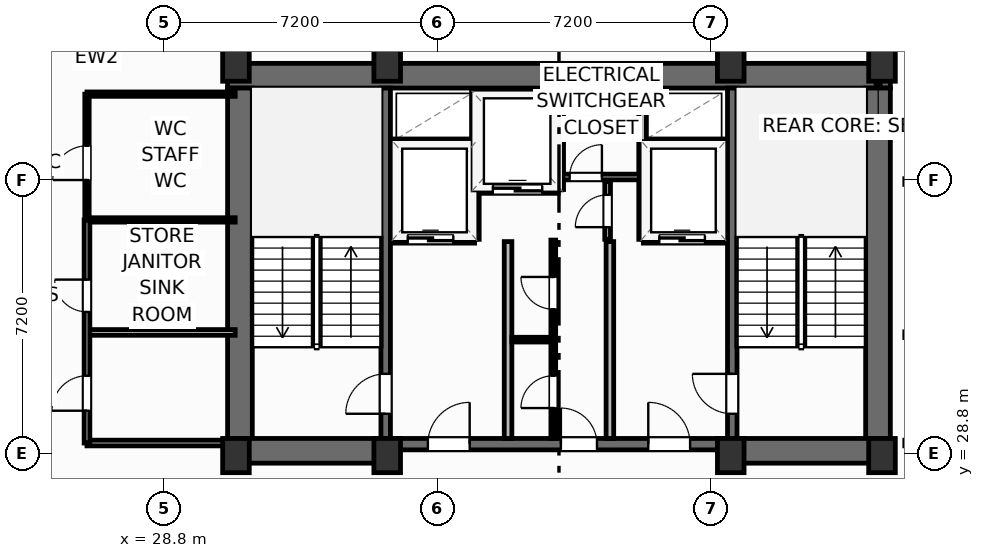
"""IFC4 building model, lengths in metres.
Left out: names, types, materials, properties, quantities, classifications, styles, units other than length and angle.
Written with IfcOpenShell. Run it as: python <this file> out.ifc"""

import sys

from ifc_helpers import new_model, si_unit, direction, frame, frame_2d, origin, origin_2d, place, context, subcontext, project, spatial, rectangle, extrude, element, fill, save


model = new_model("IFC4")
c1 = context("Model", 3, precision=1e-05, world=origin(), true_north=direction((0.0, 1.0)))
c2 = subcontext(c1, "Body", "Model", "MODEL_VIEW")
j1 = project(units=[si_unit("LENGTHUNIT", "METRE"), si_unit("PLANEANGLEUNIT", "RADIAN")], contexts=[c1])
p1 = place(None, origin())
s1 = spatial("IfcSite", under=j1, at=p1, CompositionType="ELEMENT")
p2 = place(p1, origin())
s2 = spatial("IfcBuilding", under=s1, at=p2, CompositionType="ELEMENT")
p3 = place(p2, frame((0.0, 0.0, 220.1)))
s3 = spatial("IfcBuildingStorey", under=s2, at=p3, CompositionType="ELEMENT", Elevation=220.1)
for number, where, z_axis, x_axis in (
    (1, (30.7, 28.75, 0.0), (0.0, 0.0, 1.0), (1.0, 0.0, 0.0)),
    (2, (34.68, 28.75, 0.0), (0.0, 0.0, 1.0), (1.0, 0.0, 0.0)),
    (3, (43.72, 28.75, 0.0), (0.0, 0.0, 1.0), (1.0, 0.0, 0.0)),
    (4, (47.7, 28.75, 0.0), (0.0, 0.0, 1.0), (1.0, 0.0, 0.0)),
    (5, (30.7, 39.05, 0.0), (0.0, 0.0, 1.0), (1.0, 0.0, 0.0)),
    (6, (34.68, 39.05, 0.0), (0.0, 0.0, 1.0), (1.0, 0.0, 0.0)),
    (7, (43.72, 39.05, 0.0), (0.0, 0.0, 1.0), (1.0, 0.0, 0.0)),
    (8, (47.7, 39.05, 0.0), (0.0, 0.0, 1.0), (1.0, 0.0, 0.0)),
):
    element("IfcColumn", number, at=place(p3, frame(where, z_axis=z_axis, x_axis=x_axis)), inside=s3, PredefinedType="COLUMN", context=c2, shape_type="SweptSolid", body=[
        extrude(rectangle(XDim=0.7, YDim=0.9, at=origin_2d()), origin(), (0.0, 0.0, 1.0), 3.7),
    ])
p4 = place(p3, frame((30.48, 38.745, 0.0), z_axis=(0.0, 0.0, 1.0), x_axis=(1.0, 0.0, 0.0)))
e9 = element("IfcWall", 9, at=p4, inside=s3, PredefinedType="SHEAR", context=c2, shape_type="SweptSolid", body=[
    extrude(rectangle(XDim=17.44, YDim=0.65, at=frame_2d((8.72, 0.0))), origin(), (0.0, 0.0, 1.0), 3.45),
])
for number, where, z_axis, x_axis in (
    (10, (30.805, 29.2, 0.0), (0.0, 0.0, 1.0), (0.0, 1.0, 0.0)),
    (11, (47.595, 29.2, 0.0), (0.0, 0.0, 1.0), (0.0, 1.0, 0.0)),
):
    element("IfcWall", number, at=place(p3, frame(where, z_axis=z_axis, x_axis=x_axis)), inside=s3, PredefinedType="SHEAR", context=c2, shape_type="SweptSolid", body=[
        extrude(rectangle(XDim=9.22, YDim=0.65, at=frame_2d((4.61, 0.0))), origin(), (0.0, 0.0, 1.0), 3.45),
    ])
p5 = place(p3, frame((30.48, 28.875, 0.0), z_axis=(0.0, 0.0, 1.0), x_axis=(1.0, 0.0, 0.0)))
e12 = element("IfcWall", 12, at=p5, inside=s3, PredefinedType="SHEAR", context=c2, shape_type="SweptSolid", body=[
    extrude(rectangle(XDim=4.32, YDim=0.65, at=frame_2d((2.16, 0.0))), origin(), (0.0, 0.0, 1.0), 3.45),
])
p6 = place(p3, frame((43.6, 28.875, 0.0), z_axis=(0.0, 0.0, 1.0), x_axis=(1.0, 0.0, 0.0)))
e13 = element("IfcWall", 13, at=p6, inside=s3, PredefinedType="SHEAR", context=c2, shape_type="SweptSolid", body=[
    extrude(rectangle(XDim=4.32, YDim=0.65, at=frame_2d((2.16, 0.0))), origin(), (0.0, 0.0, 1.0), 3.45),
])
p7 = place(p3, frame((34.8, 29.05, 0.0), z_axis=(0.0, 0.0, 1.0), x_axis=(1.0, 0.0, 0.0)))
e14 = element("IfcWall", 14, at=p7, inside=s3, PredefinedType="SHEAR", context=c2, shape_type="SweptSolid", body=[
    extrude(rectangle(XDim=8.8, YDim=0.3, at=frame_2d((4.4, 0.0))), origin(), (0.0, 0.0, 1.0), 3.45),
])
p8 = place(p7, frame((0.95, 0.0, 0.0)))
e15 = element("IfcOpeningElement", 15, at=p8, cuts=e14, PredefinedType="OPENING", context=c2, shape_type="SweptSolid", body=[
    extrude(rectangle(XDim=1.1, YDim=2.15, at=frame_2d((0.55, 1.075))), frame((0.0, 0.16, 0.0), z_axis=(0.0, -1.0, 0.0), x_axis=(1.0, 0.0, 0.0)), (0.0, 0.0, 1.0), 0.32),
])
p9 = place(p7, frame((6.75, 0.0, 0.0)))
e16 = element("IfcOpeningElement", 16, at=p9, cuts=e14, PredefinedType="OPENING", context=c2, shape_type="SweptSolid", body=[
    extrude(rectangle(XDim=1.1, YDim=2.15, at=frame_2d((0.55, 1.075))), frame((0.0, 0.16, 0.0), z_axis=(0.0, -1.0, 0.0), x_axis=(1.0, 0.0, 0.0)), (0.0, 0.0, 1.0), 0.32),
])
p10 = place(p7, frame((4.45, 0.0, 0.0)))
e17 = element("IfcOpeningElement", 17, at=p10, cuts=e14, PredefinedType="OPENING", context=c2, shape_type="SweptSolid", body=[
    extrude(rectangle(XDim=0.95, YDim=2.15, at=frame_2d((0.475, 1.075))), frame((0.0, 0.16, 0.0), z_axis=(0.0, -1.0, 0.0), x_axis=(1.0, 0.0, 0.0)), (0.0, 0.0, 1.0), 0.32),
])
p11 = place(p3, frame((34.64, 29.2, 0.0), z_axis=(0.0, 0.0, 1.0), x_axis=(0.0, 1.0, 0.0)))
e18 = element("IfcWall", 18, at=p11, inside=s3, PredefinedType="SHEAR", context=c2, shape_type="SweptSolid", body=[
    extrude(rectangle(XDim=9.22, YDim=0.25, at=frame_2d((4.61, 0.0))), origin(), (0.0, 0.0, 1.0), 3.45),
])
p12 = place(p11, frame((0.65, 0.0, 0.0)))
e19 = element("IfcOpeningElement", 19, at=p12, cuts=e18, PredefinedType="OPENING", context=c2, shape_type="SweptSolid", body=[
    extrude(rectangle(XDim=1.05, YDim=2.15, at=frame_2d((0.525, 1.075))), frame((0.0, 0.135, 0.0), z_axis=(0.0, -1.0, 0.0), x_axis=(1.0, 0.0, 0.0)), (0.0, 0.0, 1.0), 0.27),
])
p13 = place(p3, frame((43.76, 29.2, 0.0), z_axis=(0.0, 0.0, 1.0), x_axis=(0.0, 1.0, 0.0)))
e20 = element("IfcWall", 20, at=p13, inside=s3, PredefinedType="SHEAR", context=c2, shape_type="SweptSolid", body=[
    extrude(rectangle(XDim=9.22, YDim=0.25, at=frame_2d((4.61, 0.0))), origin(), (0.0, 0.0, 1.0), 3.45),
])
p14 = place(p13, frame((0.65, 0.0, 0.0)))
e21 = element("IfcOpeningElement", 21, at=p14, cuts=e20, PredefinedType="OPENING", context=c2, shape_type="SweptSolid", body=[
    extrude(rectangle(XDim=1.05, YDim=2.15, at=frame_2d((0.525, 1.075))), frame((0.0, 0.135, 0.0), z_axis=(0.0, -1.0, 0.0), x_axis=(1.0, 0.0, 0.0)), (0.0, 0.0, 1.0), 0.27),
])
p15 = place(p3, frame((23.149, 38.887, 0.0), z_axis=(0.0, 0.0, 1.0), x_axis=(0.9352192676, 0.354069091436, 0.0)))
e22 = element("IfcWall", 22, at=p15, inside=s3, PredefinedType="SOLIDWALL", context=c2, shape_type="SweptSolid", body=[
    extrude(rectangle(XDim=6.0, YDim=0.22, at=frame_2d((3.0, 0.0))), origin(), (0.0, 0.0, 1.0), 2.73),
])
p16 = place(p15, frame((3.5, 0.0, 0.0)))
e23 = element("IfcOpeningElement", 23, at=p16, cuts=e22, PredefinedType="OPENING", context=c2, shape_type="SweptSolid", body=[
    extrude(rectangle(XDim=2.1, YDim=2.3, at=frame_2d((1.05, 1.15))), frame((0.0, 0.12, 0.0), z_axis=(0.0, -1.0, 0.0), x_axis=(1.0, 0.0, 0.0)), (0.0, 0.0, 1.0), 0.24),
])
p17 = place(p15, frame((0.55, 0.0, 0.75)))
e24 = element("IfcOpeningElement", 24, at=p17, cuts=e22, PredefinedType="OPENING", context=c2, shape_type="SweptSolid", body=[
    extrude(rectangle(XDim=1.85, YDim=1.75, at=frame_2d((0.925, 0.875))), frame((0.0, 0.12, 0.0), z_axis=(0.0, -1.0, 0.0), x_axis=(1.0, 0.0, 0.0)), (0.0, 0.0, 1.0), 0.24),
])
for number, where, z_axis, x_axis in (
    (25, (37.86, 29.2, 0.0), (0.0, 0.0, 1.0), (0.0, 1.0, 0.0)),
    (26, (40.54, 29.2, 0.0), (0.0, 0.0, 1.0), (0.0, 1.0, 0.0)),
):
    element("IfcWall", number, at=place(p3, frame(where, z_axis=z_axis, x_axis=x_axis)), inside=s3, PredefinedType="PARTITIONING", context=c2, shape_type="SweptSolid", body=[
        extrude(rectangle(XDim=5.18, YDim=0.2, at=frame_2d((2.59, 0.0))), origin(), (0.0, 0.0, 1.0), 3.45),
    ])
p18 = place(p3, frame((34.8, 34.44, 0.0), z_axis=(0.0, 0.0, 1.0), x_axis=(1.0, 0.0, 0.0)))
e27 = element("IfcWall", 27, at=p18, inside=s3, PredefinedType="PARTITIONING", context=c2, shape_type="SweptSolid", body=[
    extrude(rectangle(XDim=2.18, YDim=0.2, at=frame_2d((1.09, 0.0))), origin(), (0.0, 0.0, 1.0), 3.45),
])
p19 = place(p18, frame((0.42, 0.0, 0.0)))
e28 = element("IfcOpeningElement", 28, at=p19, cuts=e27, PredefinedType="OPENING", context=c2, shape_type="SweptSolid", body=[
    extrude(rectangle(XDim=1.2, YDim=2.2, at=frame_2d((0.6, 1.1))), frame((0.0, 0.11, 0.0), z_axis=(0.0, -1.0, 0.0), x_axis=(1.0, 0.0, 0.0)), (0.0, 0.0, 1.0), 0.22),
])
p20 = place(p3, frame((34.8, 36.98, 0.0), z_axis=(0.0, 0.0, 1.0), x_axis=(1.0, 0.0, 0.0)))
e29 = element("IfcWall", 29, at=p20, inside=s3, PredefinedType="PARTITIONING", context=c2, shape_type="SweptSolid", body=[
    extrude(rectangle(XDim=2.18, YDim=0.2, at=frame_2d((1.09, 0.0))), origin(), (0.0, 0.0, 1.0), 3.45),
])
p21 = place(p3, frame((37.0, 34.44, 0.0), z_axis=(0.0, 0.0, 1.0), x_axis=(0.0, 1.0, 0.0)))
e30 = element("IfcWall", 30, at=p21, inside=s3, PredefinedType="PARTITIONING", context=c2, shape_type="SweptSolid", body=[
    extrude(rectangle(XDim=3.9, YDim=0.2, at=frame_2d((1.95, 0.0))), origin(), (0.0, 0.0, 1.0), 3.45),
])
p22 = place(p3, frame((41.42, 34.44, 0.0), z_axis=(0.0, 0.0, 1.0), x_axis=(1.0, 0.0, 0.0)))
e31 = element("IfcWall", 31, at=p22, inside=s3, PredefinedType="PARTITIONING", context=c2, shape_type="SweptSolid", body=[
    extrude(rectangle(XDim=2.18, YDim=0.2, at=frame_2d((1.09, 0.0))), origin(), (0.0, 0.0, 1.0), 3.45),
])
p23 = place(p22, frame((0.42, 0.0, 0.0)))
e32 = element("IfcOpeningElement", 32, at=p23, cuts=e31, PredefinedType="OPENING", context=c2, shape_type="SweptSolid", body=[
    extrude(rectangle(XDim=1.2, YDim=2.2, at=frame_2d((0.6, 1.1))), frame((0.0, 0.11, 0.0), z_axis=(0.0, -1.0, 0.0), x_axis=(1.0, 0.0, 0.0)), (0.0, 0.0, 1.0), 0.22),
])
p24 = place(p3, frame((41.42, 36.98, 0.0), z_axis=(0.0, 0.0, 1.0), x_axis=(1.0, 0.0, 0.0)))
e33 = element("IfcWall", 33, at=p24, inside=s3, PredefinedType="PARTITIONING", context=c2, shape_type="SweptSolid", body=[
    extrude(rectangle(XDim=2.18, YDim=0.2, at=frame_2d((1.09, 0.0))), origin(), (0.0, 0.0, 1.0), 3.45),
])
p25 = place(p3, frame((41.4, 34.44, 0.0), z_axis=(0.0, 0.0, 1.0), x_axis=(0.0, 1.0, 0.0)))
e34 = element("IfcWall", 34, at=p25, inside=s3, PredefinedType="PARTITIONING", context=c2, shape_type="SweptSolid", body=[
    extrude(rectangle(XDim=3.9, YDim=0.2, at=frame_2d((1.95, 0.0))), origin(), (0.0, 0.0, 1.0), 3.45),
])
p26 = place(p3, frame((37.06, 35.75, 0.0), z_axis=(0.0, 0.0, 1.0), x_axis=(1.0, 0.0, 0.0)))
e35 = element("IfcWall", 35, at=p26, inside=s3, PredefinedType="PARTITIONING", context=c2, shape_type="SweptSolid", body=[
    extrude(rectangle(XDim=2.12, YDim=0.2, at=frame_2d((1.06, 0.0))), origin(), (0.0, 0.0, 1.0), 3.45),
])
p27 = place(p26, frame((0.4, 0.0, 0.0)))
e36 = element("IfcOpeningElement", 36, at=p27, cuts=e35, PredefinedType="OPENING", context=c2, shape_type="SweptSolid", body=[
    extrude(rectangle(XDim=1.3, YDim=2.2, at=frame_2d((0.65, 1.1))), frame((0.0, 0.11, 0.0), z_axis=(0.0, -1.0, 0.0), x_axis=(1.0, 0.0, 0.0)), (0.0, 0.0, 1.0), 0.22),
])
p28 = place(p3, frame((39.22, 35.75, 0.0), z_axis=(0.0, 0.0, 1.0), x_axis=(0.0, 1.0, 0.0)))
e37 = element("IfcWall", 37, at=p28, inside=s3, PredefinedType="PARTITIONING", context=c2, shape_type="SweptSolid", body=[
    extrude(rectangle(XDim=2.59, YDim=0.2, at=frame_2d((1.295, 0.0))), origin(), (0.0, 0.0, 1.0), 3.45),
])
p29 = place(p3, frame((39.3, 36.08, 0.0), z_axis=(0.0, 0.0, 1.0), x_axis=(1.0, 0.0, 0.0)))
e38 = element("IfcWall", 38, at=p29, inside=s3, PredefinedType="PARTITIONING", context=c2, shape_type="SweptSolid", body=[
    extrude(rectangle(XDim=2.02, YDim=0.15, at=frame_2d((1.01, 0.0))), origin(), (0.0, 0.0, 1.0), 3.45),
])
p30 = place(p29, frame((0.18, 0.0, 0.0)))
e39 = element("IfcOpeningElement", 39, at=p30, cuts=e38, PredefinedType="OPENING", context=c2, shape_type="SweptSolid", body=[
    extrude(rectangle(XDim=0.85, YDim=2.05, at=frame_2d((0.425, 1.025))), frame((0.0, 0.085, 0.0), z_axis=(0.0, -1.0, 0.0), x_axis=(1.0, 0.0, 0.0)), (0.0, 0.0, 1.0), 0.17),
])
p31 = place(p3, frame((40.48, 34.44, 0.0), z_axis=(0.0, 0.0, 1.0), x_axis=(0.0, 1.0, 0.0)))
e40 = element("IfcWall", 40, at=p31, inside=s3, PredefinedType="PARTITIONING", context=c2, shape_type="SweptSolid", body=[
    extrude(rectangle(XDim=1.52, YDim=0.15, at=frame_2d((0.76, 0.0))), origin(), (0.0, 0.0, 1.0), 3.45),
])
p32 = place(p31, frame((0.32, 0.0, 0.0)))
e41 = element("IfcOpeningElement", 41, at=p32, cuts=e40, PredefinedType="OPENING", context=c2, shape_type="SweptSolid", body=[
    extrude(rectangle(XDim=0.85, YDim=2.05, at=frame_2d((0.425, 1.025))), frame((0.0, 0.085, 0.0), z_axis=(0.0, -1.0, 0.0), x_axis=(1.0, 0.0, 0.0)), (0.0, 0.0, 1.0), 0.17),
])
p33 = place(p3, frame((37.96, 31.8, 0.0), z_axis=(0.0, 0.0, 1.0), x_axis=(1.0, 0.0, 0.0)))
e42 = element("IfcWall", 42, at=p33, inside=s3, PredefinedType="PARTITIONING", context=c2, shape_type="SweptSolid", body=[
    extrude(rectangle(XDim=1.09, YDim=0.125, at=frame_2d((0.545, 0.0))), origin(), (0.0, 0.0, 1.0), 3.45),
])
p34 = place(p3, frame((39.05, 29.2, 0.0), z_axis=(0.0, 0.0, 1.0), x_axis=(0.0, 1.0, 0.0)))
e43 = element("IfcWall", 43, at=p34, inside=s3, PredefinedType="PARTITIONING", context=c2, shape_type="SweptSolid", body=[
    extrude(rectangle(XDim=5.22, YDim=0.125, at=frame_2d((2.61, 0.0))), origin(), (0.0, 0.0, 1.0), 3.45),
])
p35 = place(p34, frame((0.8, 0.0, 0.0)))
e44 = element("IfcOpeningElement", 44, at=p35, cuts=e43, PredefinedType="OPENING", context=c2, shape_type="SweptSolid", body=[
    extrude(rectangle(XDim=0.85, YDim=2.05, at=frame_2d((0.425, 1.025))), frame((0.0, 0.073, 0.0), z_axis=(0.0, -1.0, 0.0), x_axis=(1.0, 0.0, 0.0)), (0.0, 0.0, 1.0), 0.145),
])
p36 = place(p34, frame((3.4, 0.0, 0.0)))
e45 = element("IfcOpeningElement", 45, at=p36, cuts=e43, PredefinedType="OPENING", context=c2, shape_type="SweptSolid", body=[
    extrude(rectangle(XDim=0.85, YDim=2.05, at=frame_2d((0.425, 1.025))), frame((0.0, 0.073, 0.0), z_axis=(0.0, -1.0, 0.0), x_axis=(1.0, 0.0, 0.0)), (0.0, 0.0, 1.0), 0.145),
])
p37 = place(p3, frame((26.78, 29.08, 0.0), z_axis=(0.0, 0.0, 1.0), x_axis=(1.0, 0.0, 0.0)))
e46 = element("IfcWall", 46, at=p37, inside=s3, PredefinedType="PARTITIONING", context=c2, shape_type="SweptSolid", body=[
    extrude(rectangle(XDim=3.7, YDim=0.15, at=frame_2d((1.85, 0.0))), origin(), (0.0, 0.0, 1.0), 3.45),
])
p38 = place(p3, frame((26.8, 31.99, 0.0), z_axis=(0.0, 0.0, 1.0), x_axis=(1.0, 0.0, 0.0)))
e47 = element("IfcWall", 47, at=p38, inside=s3, PredefinedType="PARTITIONING", context=c2, shape_type="SweptSolid", body=[
    extrude(rectangle(XDim=3.88, YDim=0.15, at=frame_2d((1.94, 0.0))), origin(), (0.0, 0.0, 1.0), 3.45),
])
p39 = place(p3, frame((26.8, 34.95, 0.0), z_axis=(0.0, 0.0, 1.0), x_axis=(1.0, 0.0, 0.0)))
e48 = element("IfcWall", 48, at=p39, inside=s3, PredefinedType="PARTITIONING", context=c2, shape_type="SweptSolid", body=[
    extrude(rectangle(XDim=3.88, YDim=0.115, at=frame_2d((1.94, 0.0))), origin(), (0.0, 0.0, 1.0), 3.45),
])
p40 = place(p3, frame((26.78, 38.26, 0.0), z_axis=(0.0, 0.0, 1.0), x_axis=(1.0, 0.0, 0.0)))
e49 = element("IfcWall", 49, at=p40, inside=s3, PredefinedType="PARTITIONING", context=c2, shape_type="SweptSolid", body=[
    extrude(rectangle(XDim=3.9, YDim=0.115, at=frame_2d((1.95, 0.0))), origin(), (0.0, 0.0, 1.0), 3.45),
])
p41 = place(p3, frame((26.78, 29.08, 0.0), z_axis=(0.0, 0.0, 1.0), x_axis=(0.0, 1.0, 0.0)))
e50 = element("IfcWall", 50, at=p41, inside=s3, PredefinedType="PARTITIONING", context=c2, shape_type="SweptSolid", body=[
    extrude(rectangle(XDim=5.87, YDim=0.15, at=frame_2d((2.935, 0.0))), origin(), (0.0, 0.0, 1.0), 3.45),
])
p42 = place(p41, frame((0.85, 0.0, 0.0)))
e51 = element("IfcOpeningElement", 51, at=p42, cuts=e50, PredefinedType="OPENING", context=c2, shape_type="SweptSolid", body=[
    extrude(rectangle(XDim=0.92, YDim=2.05, at=frame_2d((0.46, 1.025))), frame((0.0, 0.085, 0.0), z_axis=(0.0, -1.0, 0.0), x_axis=(1.0, 0.0, 0.0)), (0.0, 0.0, 1.0), 0.17),
])
p43 = place(p41, frame((3.45, 0.0, 0.0)))
e52 = element("IfcOpeningElement", 52, at=p43, cuts=e50, PredefinedType="OPENING", context=c2, shape_type="SweptSolid", body=[
    extrude(rectangle(XDim=0.85, YDim=2.05, at=frame_2d((0.425, 1.025))), frame((0.0, 0.085, 0.0), z_axis=(0.0, -1.0, 0.0), x_axis=(1.0, 0.0, 0.0)), (0.0, 0.0, 1.0), 0.17),
])
p44 = place(p3, frame((26.78, 34.95, 0.0), z_axis=(0.0, 0.0, 1.0), x_axis=(0.0, 1.0, 0.0)))
e53 = element("IfcWall", 53, at=p44, inside=s3, PredefinedType="PARTITIONING", context=c2, shape_type="SweptSolid", body=[
    extrude(rectangle(XDim=3.31, YDim=0.115, at=frame_2d((1.655, 0.0))), origin(), (0.0, 0.0, 1.0), 3.45),
])
p45 = place(p44, frame((1.05, 0.0, 0.0)))
e54 = element("IfcOpeningElement", 54, at=p45, cuts=e53, PredefinedType="OPENING", context=c2, shape_type="SweptSolid", body=[
    extrude(rectangle(XDim=0.9, YDim=2.05, at=frame_2d((0.45, 1.025))), frame((0.0, 0.067, 0.0), z_axis=(0.0, -1.0, 0.0), x_axis=(1.0, 0.0, 0.0)), (0.0, 0.0, 1.0), 0.135),
])
p46 = place(p12, origin())
e55 = element("IfcDoor", 55, at=p46, inside=s3, OperationType="SINGLE_SWING_LEFT", PredefinedType="DOOR", context=c2, shape_type="SweptSolid", body=[
    extrude(rectangle(XDim=1.05, YDim=2.15, at=frame_2d((0.525, 1.075))), frame((0.0, 0.025, 0.0), z_axis=(0.0, -1.0, 0.0), x_axis=(1.0, 0.0, 0.0)), (0.0, 0.0, 1.0), 0.05),
])
fill(e19, e55)
p47 = place(p14, origin())
e56 = element("IfcDoor", 56, at=p47, inside=s3, OperationType="SINGLE_SWING_RIGHT", PredefinedType="DOOR", context=c2, shape_type="SweptSolid", body=[
    extrude(rectangle(XDim=1.05, YDim=2.15, at=frame_2d((0.525, 1.075))), frame((0.0, 0.025, 0.0), z_axis=(0.0, -1.0, 0.0), x_axis=(1.0, 0.0, 0.0)), (0.0, 0.0, 1.0), 0.05),
])
fill(e21, e56)
p48 = place(p8, origin())
e57 = element("IfcDoor", 57, at=p48, inside=s3, OperationType="SINGLE_SWING_RIGHT", PredefinedType="DOOR", context=c2, shape_type="SweptSolid", body=[
    extrude(rectangle(XDim=1.1, YDim=2.15, at=frame_2d((0.55, 1.075))), frame((0.0, 0.025, 0.0), z_axis=(0.0, -1.0, 0.0), x_axis=(1.0, 0.0, 0.0)), (0.0, 0.0, 1.0), 0.05),
])
fill(e15, e57)
p49 = place(p9, origin())
e58 = element("IfcDoor", 58, at=p49, inside=s3, OperationType="SINGLE_SWING_LEFT", PredefinedType="DOOR", context=c2, shape_type="SweptSolid", body=[
    extrude(rectangle(XDim=1.1, YDim=2.15, at=frame_2d((0.55, 1.075))), frame((0.0, 0.025, 0.0), z_axis=(0.0, -1.0, 0.0), x_axis=(1.0, 0.0, 0.0)), (0.0, 0.0, 1.0), 0.05),
])
fill(e16, e58)
p50 = place(p19, origin())
e59 = element("IfcDoor", 59, at=p50, inside=s3, OperationType="SLIDING_TO_LEFT", PredefinedType="DOOR", context=c2, shape_type="SweptSolid", body=[
    extrude(rectangle(XDim=1.2, YDim=2.2, at=frame_2d((0.6, 1.1))), frame((0.0, 0.025, 0.0), z_axis=(0.0, -1.0, 0.0), x_axis=(1.0, 0.0, 0.0)), (0.0, 0.0, 1.0), 0.05),
])
fill(e28, e59)
p51 = place(p23, origin())
e60 = element("IfcDoor", 60, at=p51, inside=s3, OperationType="SLIDING_TO_LEFT", PredefinedType="DOOR", context=c2, shape_type="SweptSolid", body=[
    extrude(rectangle(XDim=1.2, YDim=2.2, at=frame_2d((0.6, 1.1))), frame((0.0, 0.025, 0.0), z_axis=(0.0, -1.0, 0.0), x_axis=(1.0, 0.0, 0.0)), (0.0, 0.0, 1.0), 0.05),
])
fill(e32, e60)
p52 = place(p27, origin())
e61 = element("IfcDoor", 61, at=p52, inside=s3, OperationType="SLIDING_TO_LEFT", PredefinedType="DOOR", context=c2, shape_type="SweptSolid", body=[
    extrude(rectangle(XDim=1.3, YDim=2.2, at=frame_2d((0.65, 1.1))), frame((0.0, 0.025, 0.0), z_axis=(0.0, -1.0, 0.0), x_axis=(1.0, 0.0, 0.0)), (0.0, 0.0, 1.0), 0.05),
])
fill(e36, e61)
p53 = place(p30, origin())
e62 = element("IfcDoor", 62, at=p53, inside=s3, OperationType="SINGLE_SWING_RIGHT", PredefinedType="DOOR", context=c2, shape_type="SweptSolid", body=[
    extrude(rectangle(XDim=0.85, YDim=2.05, at=frame_2d((0.425, 1.025))), frame((0.0, 0.025, 0.0), z_axis=(0.0, -1.0, 0.0), x_axis=(1.0, 0.0, 0.0)), (0.0, 0.0, 1.0), 0.05),
])
fill(e39, e62)
p54 = place(p32, origin())
e63 = element("IfcDoor", 63, at=p54, inside=s3, OperationType="SINGLE_SWING_LEFT", PredefinedType="DOOR", context=c2, shape_type="SweptSolid", body=[
    extrude(rectangle(XDim=0.85, YDim=2.05, at=frame_2d((0.425, 1.025))), frame((0.0, 0.025, 0.0), z_axis=(0.0, -1.0, 0.0), x_axis=(1.0, 0.0, 0.0)), (0.0, 0.0, 1.0), 0.05),
])
fill(e41, e63)
p55 = place(p35, origin())
e64 = element("IfcDoor", 64, at=p55, inside=s3, OperationType="SINGLE_SWING_LEFT", PredefinedType="DOOR", context=c2, shape_type="SweptSolid", body=[
    extrude(rectangle(XDim=0.85, YDim=2.05, at=frame_2d((0.425, 1.025))), frame((0.0, 0.025, 0.0), z_axis=(0.0, -1.0, 0.0), x_axis=(1.0, 0.0, 0.0)), (0.0, 0.0, 1.0), 0.05),
])
fill(e44, e64)
p56 = place(p36, origin())
e65 = element("IfcDoor", 65, at=p56, inside=s3, OperationType="SINGLE_SWING_RIGHT", PredefinedType="DOOR", context=c2, shape_type="SweptSolid", body=[
    extrude(rectangle(XDim=0.85, YDim=2.05, at=frame_2d((0.425, 1.025))), frame((0.0, 0.025, 0.0), z_axis=(0.0, -1.0, 0.0), x_axis=(1.0, 0.0, 0.0)), (0.0, 0.0, 1.0), 0.05),
])
fill(e45, e65)
p57 = place(p10, origin())
e66 = element("IfcDoor", 66, at=p57, inside=s3, OperationType="SINGLE_SWING_LEFT", PredefinedType="DOOR", context=c2, shape_type="SweptSolid", body=[
    extrude(rectangle(XDim=0.95, YDim=2.15, at=frame_2d((0.475, 1.075))), frame((0.0, 0.025, 0.0), z_axis=(0.0, -1.0, 0.0), x_axis=(1.0, 0.0, 0.0)), (0.0, 0.0, 1.0), 0.05),
])
fill(e17, e66)
p58 = place(p42, origin())
e67 = element("IfcDoor", 67, at=p58, inside=s3, OperationType="SINGLE_SWING_LEFT", PredefinedType="DOOR", context=c2, shape_type="SweptSolid", body=[
    extrude(rectangle(XDim=0.92, YDim=2.05, at=frame_2d((0.46, 1.025))), frame((0.0, 0.025, 0.0), z_axis=(0.0, -1.0, 0.0), x_axis=(1.0, 0.0, 0.0)), (0.0, 0.0, 1.0), 0.05),
])
fill(e51, e67)
p59 = place(p43, origin())
e68 = element("IfcDoor", 68, at=p59, inside=s3, OperationType="SINGLE_SWING_RIGHT", PredefinedType="DOOR", context=c2, shape_type="SweptSolid", body=[
    extrude(rectangle(XDim=0.85, YDim=2.05, at=frame_2d((0.425, 1.025))), frame((0.0, 0.025, 0.0), z_axis=(0.0, -1.0, 0.0), x_axis=(1.0, 0.0, 0.0)), (0.0, 0.0, 1.0), 0.05),
])
fill(e52, e68)
p60 = place(p45, origin())
e69 = element("IfcDoor", 69, at=p60, inside=s3, OperationType="SINGLE_SWING_LEFT", PredefinedType="DOOR", context=c2, shape_type="SweptSolid", body=[
    extrude(rectangle(XDim=0.9, YDim=2.05, at=frame_2d((0.45, 1.025))), frame((0.0, 0.025, 0.0), z_axis=(0.0, -1.0, 0.0), x_axis=(1.0, 0.0, 0.0)), (0.0, 0.0, 1.0), 0.05),
])
fill(e54, e69)
save(model, sys.argv[1])
